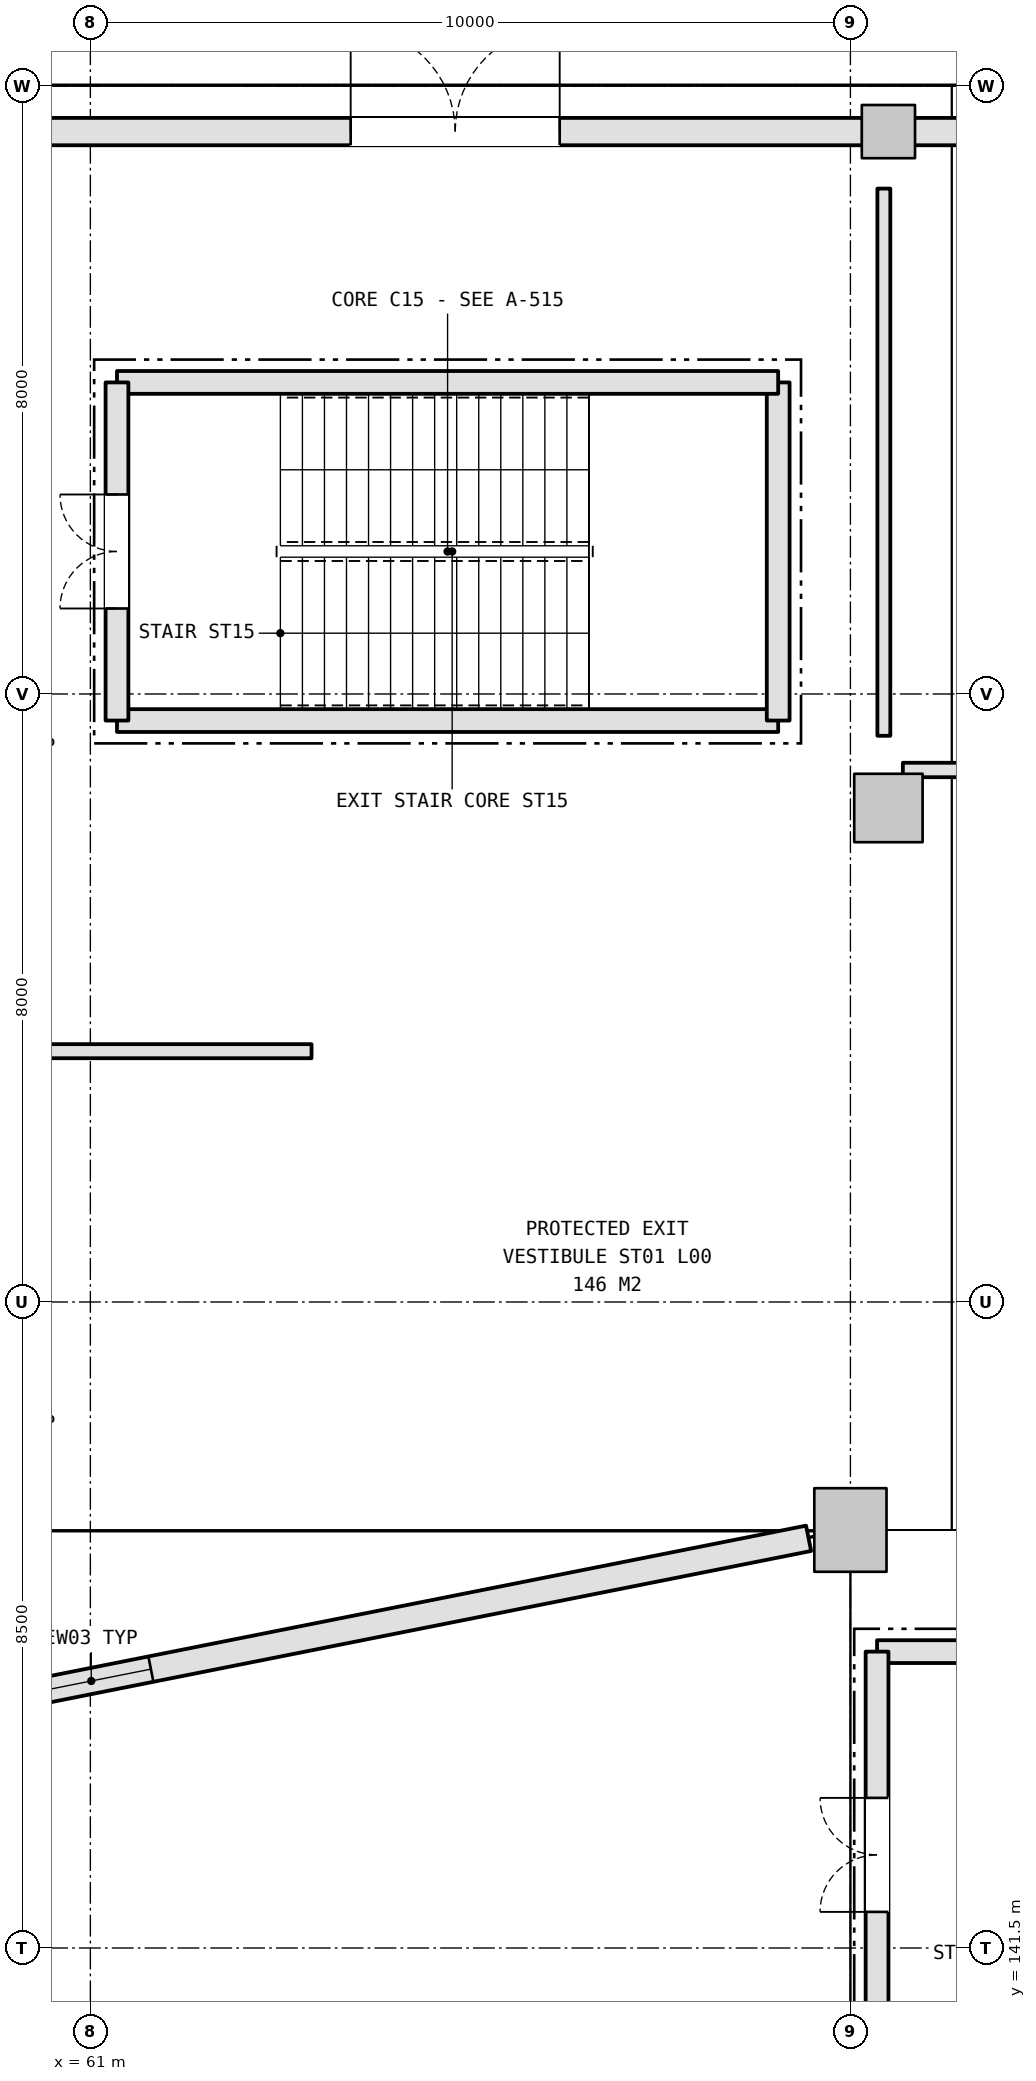
"""IFC4 building model, lengths in metres.
Left out: names, types, materials, properties, quantities, classifications, styles, units other than length and angle.
Written with IfcOpenShell. Run it as: python <this file> out.ifc"""

import sys

from ifc_helpers import new_model, si_unit, direction, frame, frame_2d, origin, origin_2d, place, context, subcontext, project, spatial, rectangle, extrude, element, fill, save


model = new_model("IFC4")
c1 = context("Model", 3, precision=1e-05, world=origin(), true_north=direction((0.0, 1.0)))
c2 = subcontext(c1, "Body", "Model", "MODEL_VIEW")
j1 = project(units=[si_unit("LENGTHUNIT", "METRE"), si_unit("PLANEANGLEUNIT", "RADIAN")], contexts=[c1])
p1 = place(None, origin())
s1 = spatial("IfcSite", under=j1, at=p1, CompositionType="ELEMENT")
p2 = place(p1, origin())
s2 = spatial("IfcBuilding", under=s1, at=p2, CompositionType="ELEMENT")
p3 = place(p2, origin())
s3 = spatial("IfcBuildingStorey", under=s2, at=p3, CompositionType="ELEMENT", Elevation=0.0)
p4 = place(p3, frame((71.0, 147.0, 0.0), z_axis=(0.0, 0.0, 1.0), x_axis=(1.0, 0.0, 0.0)))
e1 = element("IfcColumn", 1, at=p4, inside=s3, PredefinedType="COLUMN", context=c2, shape_type="SweptSolid", body=[
    extrude(rectangle(XDim=0.95, YDim=1.1, at=origin_2d()), origin(), (0.0, 0.0, 1.0), 5.4),
])
p5 = place(p3, frame((71.5, 156.5, 0.0), z_axis=(0.0, 0.0, 1.0), x_axis=(1.0, 0.0, 0.0)))
e2 = element("IfcColumn", 2, at=p5, inside=s3, PredefinedType="COLUMN", context=c2, shape_type="SweptSolid", body=[
    extrude(rectangle(XDim=0.9, YDim=0.9, at=origin_2d()), origin(), (0.0, 0.0, 1.0), 5.4),
])
p6 = place(p3, frame((71.5, 165.4, 0.0), z_axis=(0.0, 0.0, 1.0), x_axis=(1.0, 0.0, 0.0)))
e3 = element("IfcColumn", 3, at=p6, inside=s3, PredefinedType="COLUMN", context=c2, shape_type="SweptSolid", body=[
    extrude(rectangle(XDim=0.7, YDim=0.7, at=origin_2d()), origin(), (0.0, 0.0, 1.0), 5.4),
])
p7 = place(p3, frame((70.45, 146.89, 0.0), z_axis=(0.0, 0.0, 1.0), x_axis=(-0.980787488403, -0.195079221324, 0.0)))
e4 = element("IfcWall", 4, at=p7, inside=s3, PredefinedType="SOLIDWALL", context=c2, shape_type="SweptSolid", body=[
    extrude(rectangle(XDim=19.246, YDim=0.34, at=frame_2d((9.623, 0.0))), origin(), (0.0, 0.0, 1.0), 4.275),
])
p8 = place(p7, frame((8.823, 0.0, 2.4)))
e5 = element("IfcOpeningElement", 5, at=p8, cuts=e4, PredefinedType="OPENING", context=c2, shape_type="SweptSolid", body=[
    extrude(rectangle(XDim=1.6, YDim=1.2, at=frame_2d((0.8, 0.6))), frame((0.0, 0.18, 0.0), z_axis=(0.0, -1.0, 0.0), x_axis=(1.0, 0.0, 0.0)), (0.0, 0.0, 1.0), 0.36),
])
p9 = place(p3, frame((60.438, 165.4, 0.0), z_axis=(0.0, 0.0, 1.0), x_axis=(1.0, 0.0, 0.0)))
e6 = element("IfcWall", 6, at=p9, inside=s3, PredefinedType="SOLIDWALL", context=c2, shape_type="SweptSolid", body=[
    extrude(rectangle(XDim=10.724, YDim=0.36, at=frame_2d((5.362, 0.0))), origin(), (0.0, 0.0, 1.0), 4.475),
])
p10 = place(p9, frame((3.987, 0.0, 0.0)))
e7 = element("IfcOpeningElement", 7, at=p10, cuts=e6, PredefinedType="OPENING", context=c2, shape_type="SweptSolid", body=[
    extrude(rectangle(XDim=2.75, YDim=2.4, at=frame_2d((1.375, 1.2))), frame((0.0, 0.19, 0.0), z_axis=(0.0, -1.0, 0.0), x_axis=(1.0, 0.0, 0.0)), (0.0, 0.0, 1.0), 0.38),
])
p11 = place(p3, frame((71.838, 165.4, 0.0), z_axis=(0.0, 0.0, 1.0), x_axis=(1.0, 0.0, 0.0)))
e8 = element("IfcWall", 8, at=p11, inside=s3, PredefinedType="SOLIDWALL", context=c2, shape_type="SweptSolid", body=[
    extrude(rectangle(XDim=10.724, YDim=0.36, at=frame_2d((5.362, 0.0))), origin(), (0.0, 0.0, 1.0), 4.475),
])
p12 = place(p11, frame((3.987, 0.0, 0.0)))
e9 = element("IfcOpeningElement", 9, at=p12, cuts=e8, PredefinedType="OPENING", context=c2, shape_type="SweptSolid", body=[
    extrude(rectangle(XDim=2.75, YDim=2.4, at=frame_2d((1.375, 1.2))), frame((0.0, 0.19, 0.0), z_axis=(0.0, -1.0, 0.0), x_axis=(1.0, 0.0, 0.0)), (0.0, 0.0, 1.0), 0.38),
])
p13 = place(p3, frame((80.65, 145.4, 0.0), z_axis=(0.0, 0.0, 1.0), x_axis=(-1.0, 0.0, 0.0)))
e10 = element("IfcWall", 10, at=p13, inside=s3, PredefinedType="SHEAR", context=c2, shape_type="SweptSolid", body=[
    extrude(rectangle(XDim=9.299, YDim=0.3, at=frame_2d((4.65, 0.0))), origin(), (0.0, 0.0, 1.0), 5.14),
])
p14 = place(p3, frame((71.35, 145.4, 0.0), z_axis=(0.0, 0.0, 1.0), x_axis=(0.0, -1.0, 0.0)))
e11 = element("IfcWall", 11, at=p14, inside=s3, PredefinedType="SHEAR", context=c2, shape_type="SweptSolid", body=[
    extrude(rectangle(XDim=5.349, YDim=0.3, at=frame_2d((2.675, 0.0))), origin(), (0.0, 0.0, 1.0), 5.14),
])
p15 = place(p14, frame((1.925, 0.0, 0.0)))
e12 = element("IfcOpeningElement", 12, at=p15, cuts=e11, PredefinedType="OPENING", context=c2, shape_type="SweptSolid", body=[
    extrude(rectangle(XDim=1.5, YDim=2.2, at=frame_2d((0.75, 1.1))), frame((0.0, 0.16, 0.0), z_axis=(0.0, -1.0, 0.0), x_axis=(1.0, 0.0, 0.0)), (0.0, 0.0, 1.0), 0.32),
])
p16 = place(p3, frame((61.35, 157.65, 0.0), z_axis=(0.0, 0.0, 1.0), x_axis=(1.0, 0.0, 0.0)))
e13 = element("IfcWall", 13, at=p16, inside=s3, PredefinedType="SHEAR", context=c2, shape_type="SweptSolid", body=[
    extrude(rectangle(XDim=8.699, YDim=0.3, at=frame_2d((4.35, 0.0))), origin(), (0.0, 0.0, 1.0), 5.14),
])
p17 = place(p3, frame((70.05, 157.65, 0.0), z_axis=(0.0, 0.0, 1.0), x_axis=(0.0, 1.0, 0.0)))
e14 = element("IfcWall", 14, at=p17, inside=s3, PredefinedType="SHEAR", context=c2, shape_type="SweptSolid", body=[
    extrude(rectangle(XDim=4.449, YDim=0.3, at=frame_2d((2.225, 0.0))), origin(), (0.0, 0.0, 1.0), 5.14),
])
p18 = place(p3, frame((70.05, 162.1, 0.0), z_axis=(0.0, 0.0, 1.0), x_axis=(-1.0, 0.0, 0.0)))
e15 = element("IfcWall", 15, at=p18, inside=s3, PredefinedType="SHEAR", context=c2, shape_type="SweptSolid", body=[
    extrude(rectangle(XDim=8.699, YDim=0.3, at=frame_2d((4.35, 0.0))), origin(), (0.0, 0.0, 1.0), 5.14),
])
p19 = place(p3, frame((61.35, 162.1, 0.0), z_axis=(0.0, 0.0, 1.0), x_axis=(0.0, -1.0, 0.0)))
e16 = element("IfcWall", 16, at=p19, inside=s3, PredefinedType="SHEAR", context=c2, shape_type="SweptSolid", body=[
    extrude(rectangle(XDim=4.449, YDim=0.3, at=frame_2d((2.225, 0.0))), origin(), (0.0, 0.0, 1.0), 5.14),
])
p20 = place(p19, frame((1.475, 0.0, 0.0)))
e17 = element("IfcOpeningElement", 17, at=p20, cuts=e16, PredefinedType="OPENING", context=c2, shape_type="SweptSolid", body=[
    extrude(rectangle(XDim=1.5, YDim=2.2, at=frame_2d((0.75, 1.1))), frame((0.0, 0.16, 0.0), z_axis=(0.0, -1.0, 0.0), x_axis=(1.0, 0.0, 0.0)), (0.0, 0.0, 1.0), 0.32),
])
p21 = place(p3, frame((53.95, 153.3, 0.0), z_axis=(0.0, 0.0, 1.0), x_axis=(1.0, 0.0, 0.0)))
e18 = element("IfcWall", 18, at=p21, inside=s3, PredefinedType="PARTITIONING", context=c2, shape_type="SweptSolid", body=[
    extrude(rectangle(XDim=9.96, YDim=0.185, at=frame_2d((4.98, 0.0))), origin(), (0.0, 0.0, 1.0), 4.525),
])
p22 = place(p21, frame((4.44, 0.0, 0.0)))
e19 = element("IfcOpeningElement", 19, at=p22, cuts=e18, PredefinedType="OPENING", context=c2, shape_type="SweptSolid", body=[
    extrude(rectangle(XDim=1.08, YDim=2.25, at=frame_2d((0.54, 1.125))), frame((0.0, 0.103, 0.0), z_axis=(0.0, -1.0, 0.0), x_axis=(1.0, 0.0, 0.0)), (0.0, 0.0, 1.0), 0.205),
])
p23 = place(p3, frame((75.25, 157.0, 0.0), z_axis=(0.0, 0.0, 1.0), x_axis=(-1.0, 0.0, 0.0)))
e20 = element("IfcWall", 20, at=p23, inside=s3, PredefinedType="PARTITIONING", context=c2, shape_type="SweptSolid", body=[
    extrude(rectangle(XDim=3.56, YDim=0.19, at=frame_2d((1.78, 0.0))), origin(), (0.0, 0.0, 1.0), 4.525),
])
p24 = place(p23, frame((1.155, 0.0, 0.0)))
e21 = element("IfcOpeningElement", 21, at=p24, cuts=e20, PredefinedType="OPENING", context=c2, shape_type="SweptSolid", body=[
    extrude(rectangle(XDim=1.25, YDim=2.2, at=frame_2d((0.625, 1.1))), frame((0.0, 0.105, 0.0), z_axis=(0.0, -1.0, 0.0), x_axis=(1.0, 0.0, 0.0)), (0.0, 0.0, 1.0), 0.21),
])
p25 = place(p3, frame((71.44, 157.45, 0.0), z_axis=(0.0, 0.0, 1.0), x_axis=(0.0, 1.0, 0.0)))
e22 = element("IfcWall", 22, at=p25, inside=s3, PredefinedType="PARTITIONING", context=c2, shape_type="SweptSolid", body=[
    extrude(rectangle(XDim=7.2, YDim=0.17, at=frame_2d((3.6, 0.0))), origin(), (0.0, 0.0, 1.0), 4.525),
])
p26 = place(p8, origin())
e23 = element("IfcWindow", 23, at=p26, inside=s3, PartitioningType="SINGLE_PANEL", PredefinedType="WINDOW", context=c2, shape_type="SweptSolid", body=[
    extrude(rectangle(XDim=1.6, YDim=1.2, at=frame_2d((0.8, 0.6))), frame((0.0, 0.03, 0.0), z_axis=(0.0, -1.0, 0.0), x_axis=(1.0, 0.0, 0.0)), (0.0, 0.0, 1.0), 0.06),
])
fill(e5, e23)
p27 = place(p10, origin())
e24 = element("IfcDoor", 24, at=p27, inside=s3, OperationType="DOUBLE_DOOR_SINGLE_SWING", PredefinedType="DOOR", context=c2, shape_type="SweptSolid", body=[
    extrude(rectangle(XDim=2.75, YDim=2.4, at=frame_2d((1.375, 1.2))), frame((0.0, 0.025, 0.0), z_axis=(0.0, -1.0, 0.0), x_axis=(1.0, 0.0, 0.0)), (0.0, 0.0, 1.0), 0.05),
])
fill(e7, e24)
p28 = place(p15, frame((1.5, 0.0, 0.0), z_axis=(0.0, 0.0, 1.0), x_axis=(-1.0, 0.0, 0.0)))
e25 = element("IfcDoor", 25, at=p28, inside=s3, OperationType="DOUBLE_DOOR_SINGLE_SWING", PredefinedType="DOOR", context=c2, shape_type="SweptSolid", body=[
    extrude(rectangle(XDim=1.5, YDim=2.2, at=frame_2d((0.75, 1.1))), frame((0.0, 0.025, 0.0), z_axis=(0.0, -1.0, 0.0), x_axis=(1.0, 0.0, 0.0)), (0.0, 0.0, 1.0), 0.05),
])
fill(e12, e25)
p29 = place(p20, frame((1.5, 0.0, 0.0), z_axis=(0.0, 0.0, 1.0), x_axis=(-1.0, 0.0, 0.0)))
e26 = element("IfcDoor", 26, at=p29, inside=s3, OperationType="DOUBLE_DOOR_SINGLE_SWING", PredefinedType="DOOR", context=c2, shape_type="SweptSolid", body=[
    extrude(rectangle(XDim=1.5, YDim=2.2, at=frame_2d((0.75, 1.1))), frame((0.0, 0.025, 0.0), z_axis=(0.0, -1.0, 0.0), x_axis=(1.0, 0.0, 0.0)), (0.0, 0.0, 1.0), 0.05),
])
fill(e17, e26)
save(model, sys.argv[1])
